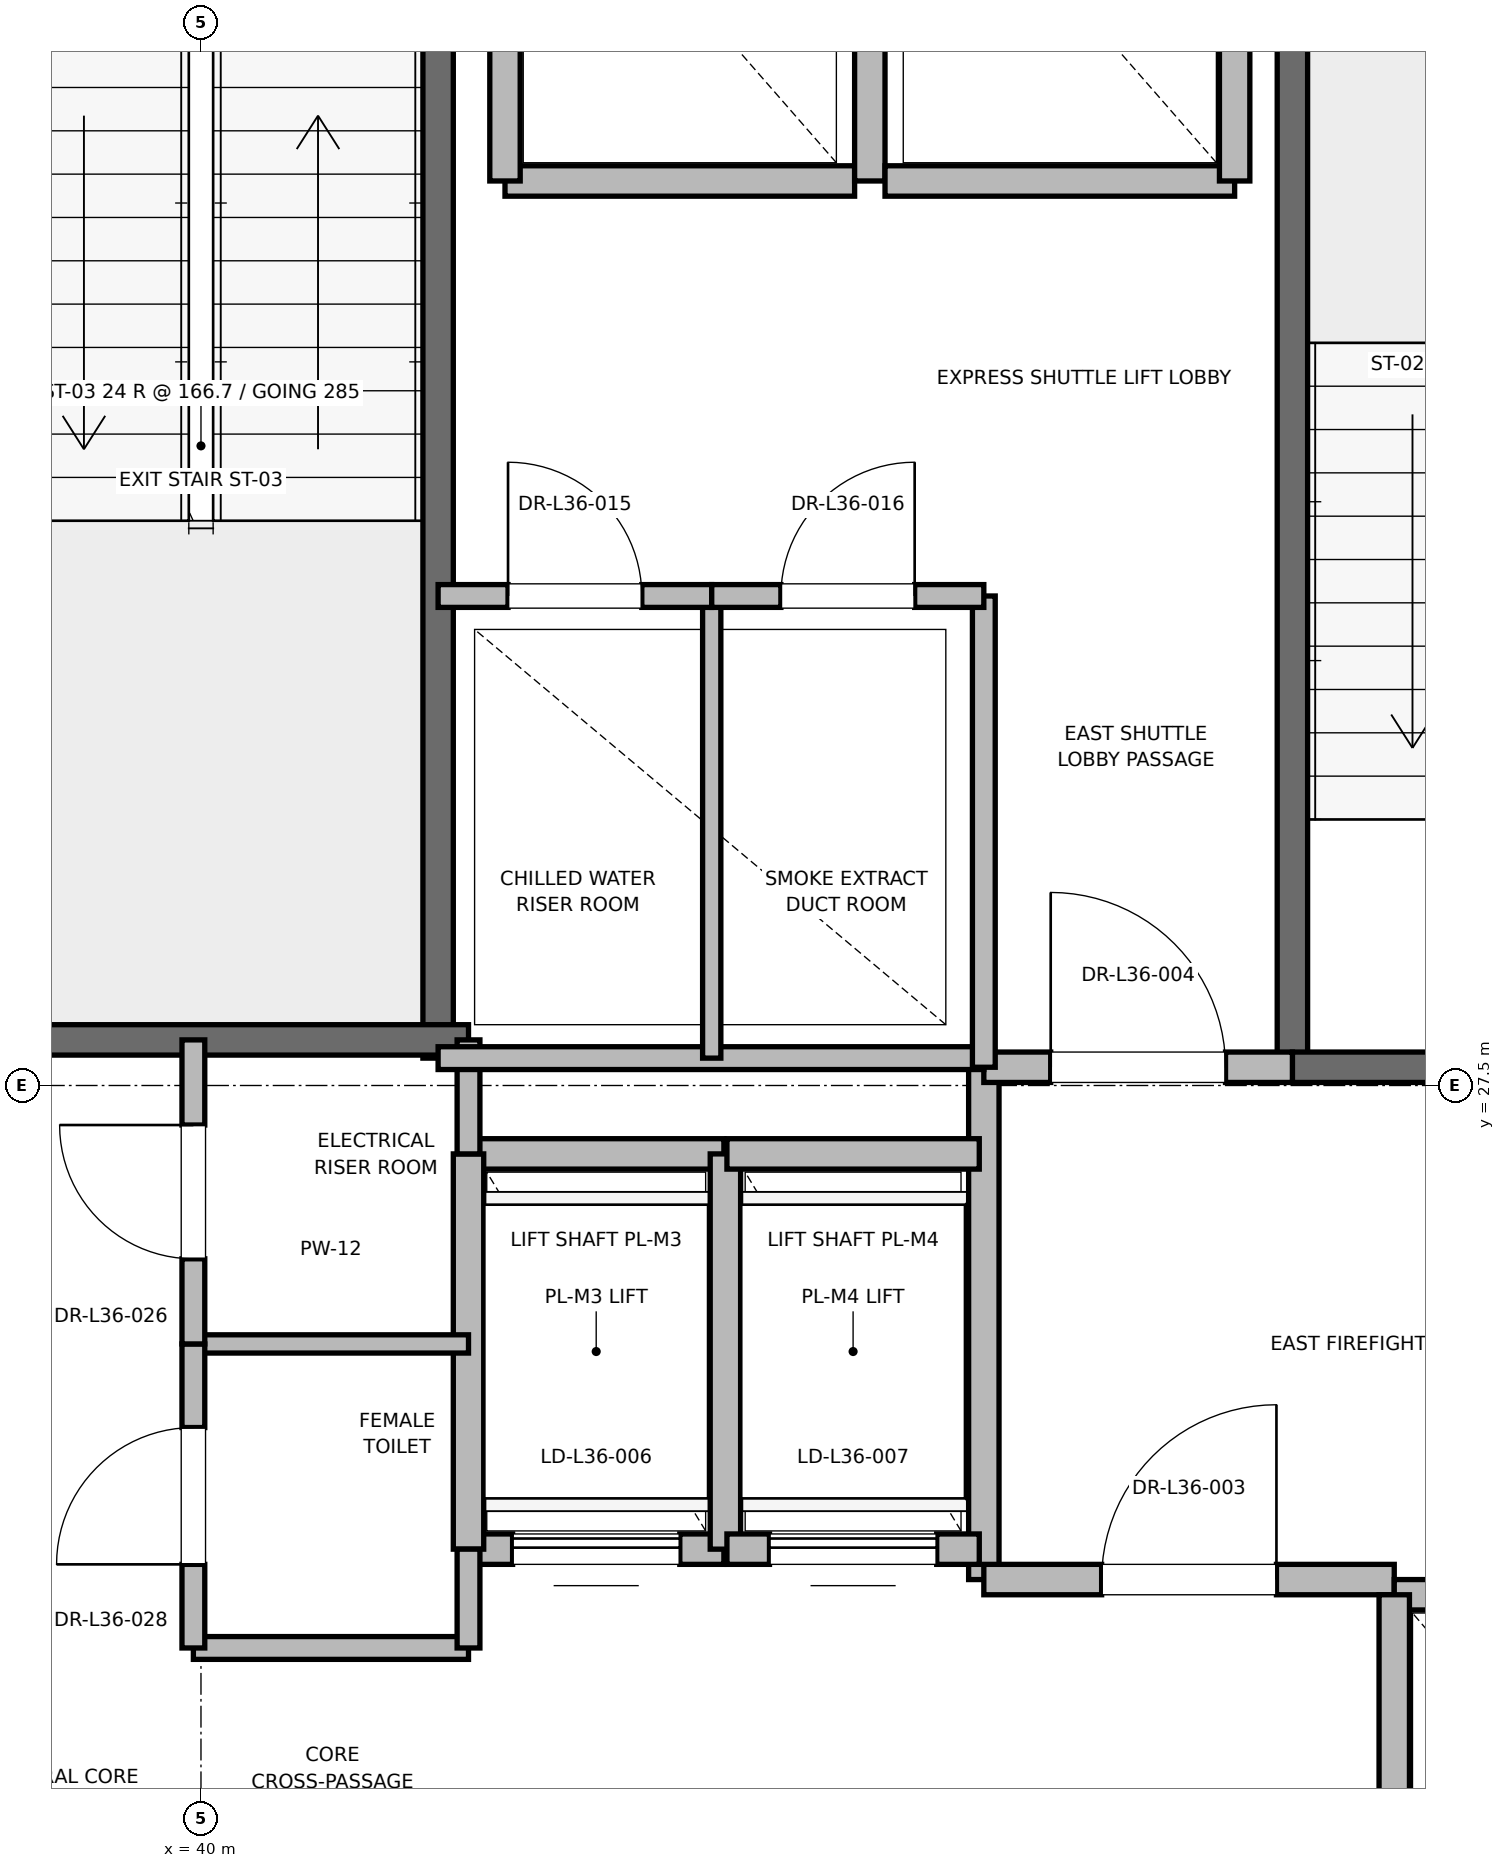
"""IFC4 building model, lengths in metres.
Left out: names, types, materials, properties, quantities, classifications, styles, units other than length and angle.
Written with IfcOpenShell. Run it as: python <this file> out.ifc"""

import sys

from ifc_helpers import new_model, si_unit, direction, frame, frame_2d, origin, place, context, subcontext, project, spatial, rectangle, extrude, element, fill, save


model = new_model("IFC4")
c1 = context("Model", 3, precision=1e-05, world=origin(), true_north=direction((0.0, 1.0)))
c2 = subcontext(c1, "Body", "Model", "MODEL_VIEW")
j1 = project(units=[si_unit("LENGTHUNIT", "METRE"), si_unit("PLANEANGLEUNIT", "RADIAN")], contexts=[c1])
p1 = place(None, origin())
s1 = spatial("IfcSite", under=j1, at=p1, CompositionType="ELEMENT")
p2 = place(p1, origin())
s2 = spatial("IfcBuilding", under=s1, at=p2, CompositionType="ELEMENT")
p3 = place(p2, frame((0.0, 0.0, 156.4)))
s3 = spatial("IfcBuildingStorey", under=s2, at=p3, CompositionType="ELEMENT", Elevation=156.4)
p4 = place(p3, frame((47.18, 27.62, 0.0), z_axis=(0.0, 0.0, 1.0), x_axis=(0.0, 1.0, 0.0)))
e1 = element("IfcWall", 1, at=p4, inside=s3, PredefinedType="SOLIDWALL", context=c2, shape_type="SweptSolid", body=[
    extrude(rectangle(XDim=8.18, YDim=0.2, at=frame_2d((4.09, 0.0))), origin(), (0.0, 0.0, 1.0), 3.775),
])
p5 = place(p3, frame((47.18, 27.62, 0.0), z_axis=(0.0, 0.0, 1.0), x_axis=(1.0, 0.0, 0.0)))
e2 = element("IfcWall", 2, at=p5, inside=s3, PredefinedType="SOLIDWALL", context=c2, shape_type="SweptSolid", body=[
    extrude(rectangle(XDim=3.12, YDim=0.2, at=frame_2d((1.56, 0.0))), origin(), (0.0, 0.0, 1.0), 3.775),
])
p6 = place(p5, frame((1.01, 0.0, 0.0)))
e3 = element("IfcOpeningElement", 3, at=p6, cuts=e2, PredefinedType="OPENING", context=c2, shape_type="SweptSolid", body=[
    extrude(rectangle(XDim=1.1, YDim=2.15, at=frame_2d((0.55, 1.075))), frame((0.0, 0.1, 0.0), z_axis=(0.0, -1.0, 0.0), x_axis=(1.0, 0.0, 0.0)), (0.0, 0.0, 1.0), 0.2),
])
p7 = place(p3, frame((41.56, 27.68, 0.0), z_axis=(0.0, 0.0, 1.0), x_axis=(0.0, 1.0, 0.0)))
e4 = element("IfcWall", 4, at=p7, inside=s3, PredefinedType="SOLIDWALL", context=c2, shape_type="SweptSolid", body=[
    extrude(rectangle(XDim=8.57, YDim=0.2, at=frame_2d((4.285, 0.0))), origin(), (0.0, 0.0, 1.0), 3.775),
])
p8 = place(p3, frame((38.44, 27.8, 0.0), z_axis=(0.0, 0.0, 1.0), x_axis=(1.0, 0.0, 0.0)))
e5 = element("IfcWall", 5, at=p8, inside=s3, PredefinedType="SOLIDWALL", context=c2, shape_type="SweptSolid", body=[
    extrude(rectangle(XDim=3.32, YDim=0.2, at=frame_2d((1.66, 0.0))), origin(), (0.0, 0.0, 1.0), 3.775),
])
p9 = place(p3, frame((45.15, 24.25, 0.0), z_axis=(0.0, 0.0, 1.0), x_axis=(0.0, 1.0, 0.0)))
e6 = element("IfcWall", 6, at=p9, inside=s3, PredefinedType="PARTITIONING", context=c2, shape_type="SweptSolid", body=[
    extrude(rectangle(XDim=3.37, YDim=0.2, at=frame_2d((1.685, 0.0))), origin(), (0.0, 0.0, 1.0), 3.775),
])
p10 = place(p3, frame((45.15, 24.25, 0.0), z_axis=(0.0, 0.0, 1.0), x_axis=(1.0, 0.0, 0.0)))
e7 = element("IfcWall", 7, at=p10, inside=s3, PredefinedType="PARTITIONING", context=c2, shape_type="SweptSolid", body=[
    extrude(rectangle(XDim=2.7, YDim=0.2, at=frame_2d((1.35, 0.0))), origin(), (0.0, 0.0, 1.0), 3.775),
])
p11 = place(p10, frame((0.775, 0.0, 0.0)))
e8 = element("IfcOpeningElement", 8, at=p11, cuts=e7, PredefinedType="OPENING", context=c2, shape_type="SweptSolid", body=[
    extrude(rectangle(XDim=1.15, YDim=2.2, at=frame_2d((0.575, 1.1))), frame((0.0, 0.1, 0.0), z_axis=(0.0, -1.0, 0.0), x_axis=(1.0, 0.0, 0.0)), (0.0, 0.0, 1.0), 0.2),
])
p12 = place(p3, frame((45.15, 27.62, 0.0), z_axis=(0.0, 0.0, 1.0), x_axis=(1.0, 0.0, 0.0)))
e9 = element("IfcWall", 9, at=p12, inside=s3, PredefinedType="PARTITIONING", context=c2, shape_type="SweptSolid", body=[
    extrude(rectangle(XDim=2.03, YDim=0.2, at=frame_2d((1.015, 0.0))), origin(), (0.0, 0.0, 1.0), 3.775),
])
p13 = place(p12, frame((0.44, 0.0, 0.0)))
e10 = element("IfcOpeningElement", 10, at=p13, cuts=e9, PredefinedType="OPENING", context=c2, shape_type="SweptSolid", body=[
    extrude(rectangle(XDim=1.15, YDim=2.2, at=frame_2d((0.575, 1.1))), frame((0.0, 0.1, 0.0), z_axis=(0.0, -1.0, 0.0), x_axis=(1.0, 0.0, 0.0)), (0.0, 0.0, 1.0), 0.2),
])
p14 = place(p3, frame((50.45, 24.15, 0.0), z_axis=(0.0, 0.0, 1.0), x_axis=(-1.0, 0.0, 0.0)))
e11 = element("IfcWall", 11, at=p14, inside=s3, PredefinedType="SOLIDWALL", context=c2, shape_type="SweptSolid", body=[
    extrude(rectangle(XDim=2.6, YDim=0.2, at=frame_2d((1.3, 0.0))), origin(), (0.0, 0.0, 1.0), 2.755),
])
p15 = place(p14, frame((0.75, 0.0, 0.0)))
e12 = element("IfcOpeningElement", 12, at=p15, cuts=e11, PredefinedType="OPENING", context=c2, shape_type="SweptSolid", body=[
    extrude(rectangle(XDim=1.1, YDim=2.2, at=frame_2d((0.55, 1.1))), frame((0.0, 0.1, 0.0), z_axis=(0.0, -1.0, 0.0), x_axis=(1.0, 0.0, 0.0)), (0.0, 0.0, 1.0), 0.2),
])
p16 = place(p3, frame((47.85, 24.15, 0.0), z_axis=(0.0, 0.0, 1.0), x_axis=(0.0, -1.0, 0.0)))
e13 = element("IfcWall", 13, at=p16, inside=s3, PredefinedType="SOLIDWALL", context=c2, shape_type="SweptSolid", body=[
    extrude(rectangle(XDim=3.0, YDim=0.2, at=frame_2d((1.5, 0.0))), origin(), (0.0, 0.0, 1.0), 3.775),
])
p17 = place(p3, frame((41.76, 24.45, 0.0), z_axis=(0.0, 0.0, 1.0), x_axis=(1.0, 0.0, 0.0)))
e14 = element("IfcWall", 14, at=p17, inside=s3, PredefinedType="SOLIDWALL", context=c2, shape_type="SweptSolid", body=[
    extrude(rectangle(XDim=1.68, YDim=0.2, at=frame_2d((0.84, 0.0))), origin(), (0.0, 0.0, 1.0), 3.775),
])
p18 = place(p17, frame((0.29, 0.0, 0.0)))
e15 = element("IfcOpeningElement", 15, at=p18, cuts=e14, PredefinedType="OPENING", context=c2, shape_type="SweptSolid", body=[
    extrude(rectangle(XDim=1.1, YDim=2.2, at=frame_2d((0.55, 1.1))), frame((0.0, 0.1, 0.0), z_axis=(0.0, -1.0, 0.0), x_axis=(1.0, 0.0, 0.0)), (0.0, 0.0, 1.0), 0.2),
])
p19 = place(p3, frame((43.44, 27.05, 0.0), z_axis=(0.0, 0.0, 1.0), x_axis=(-1.0, 0.0, 0.0)))
e16 = element("IfcWall", 16, at=p19, inside=s3, PredefinedType="SOLIDWALL", context=c2, shape_type="SweptSolid", body=[
    extrude(rectangle(XDim=1.68, YDim=0.2, at=frame_2d((0.84, 0.0))), origin(), (0.0, 0.0, 1.0), 3.775),
])
for number, where, z_axis, x_axis in (
    (17, (41.76, 27.05, 0.0), (0.0, 0.0, 1.0), (0.0, -1.0, 0.0)),
    (18, (43.45, 24.45, 0.0), (0.0, 0.0, 1.0), (0.0, 1.0, 0.0)),
):
    element("IfcWall", number, at=place(p3, frame(where, z_axis=z_axis, x_axis=x_axis)), inside=s3, PredefinedType="SOLIDWALL", context=c2, shape_type="SweptSolid", body=[
        extrude(rectangle(XDim=2.6, YDim=0.2, at=frame_2d((1.3, 0.0))), origin(), (0.0, 0.0, 1.0), 3.775),
    ])
p20 = place(p3, frame((43.46, 24.45, 0.0), z_axis=(0.0, 0.0, 1.0), x_axis=(1.0, 0.0, 0.0)))
e19 = element("IfcWall", 19, at=p20, inside=s3, PredefinedType="SOLIDWALL", context=c2, shape_type="SweptSolid", body=[
    extrude(rectangle(XDim=1.66, YDim=0.2, at=frame_2d((0.83, 0.0))), origin(), (0.0, 0.0, 1.0), 3.775),
])
p21 = place(p20, frame((0.28, 0.0, 0.0)))
e20 = element("IfcOpeningElement", 20, at=p21, cuts=e19, PredefinedType="OPENING", context=c2, shape_type="SweptSolid", body=[
    extrude(rectangle(XDim=1.1, YDim=2.2, at=frame_2d((0.55, 1.1))), frame((0.0, 0.1, 0.0), z_axis=(0.0, -1.0, 0.0), x_axis=(1.0, 0.0, 0.0)), (0.0, 0.0, 1.0), 0.2),
])
p22 = place(p3, frame((45.12, 27.05, 0.0), z_axis=(0.0, 0.0, 1.0), x_axis=(-1.0, 0.0, 0.0)))
e21 = element("IfcWall", 21, at=p22, inside=s3, PredefinedType="SOLIDWALL", context=c2, shape_type="SweptSolid", body=[
    extrude(rectangle(XDim=1.66, YDim=0.2, at=frame_2d((0.83, 0.0))), origin(), (0.0, 0.0, 1.0), 3.775),
])
p23 = place(p3, frame((42.0, 33.45, 0.0), z_axis=(0.0, 0.0, 1.0), x_axis=(1.0, 0.0, 0.0)))
e22 = element("IfcWall", 22, at=p23, inside=s3, PredefinedType="SOLIDWALL", context=c2, shape_type="SweptSolid", body=[
    extrude(rectangle(XDim=2.3, YDim=0.2, at=frame_2d((1.15, 0.0))), origin(), (0.0, 0.0, 1.0), 3.775),
])
for number, where, z_axis, x_axis in (
    (23, (42.0, 36.05, 0.0), (0.0, 0.0, 1.0), (0.0, -1.0, 0.0)),
    (24, (44.4, 33.45, 0.0), (0.0, 0.0, 1.0), (0.0, 1.0, 0.0)),
):
    element("IfcWall", number, at=place(p3, frame(where, z_axis=z_axis, x_axis=x_axis)), inside=s3, PredefinedType="SOLIDWALL", context=c2, shape_type="SweptSolid", body=[
        extrude(rectangle(XDim=2.6, YDim=0.2, at=frame_2d((1.3, 0.0))), origin(), (0.0, 0.0, 1.0), 2.755),
    ])
p24 = place(p3, frame((44.5, 33.45, 0.0), z_axis=(0.0, 0.0, 1.0), x_axis=(1.0, 0.0, 0.0)))
e25 = element("IfcWall", 25, at=p24, inside=s3, PredefinedType="SOLIDWALL", context=c2, shape_type="SweptSolid", body=[
    extrude(rectangle(XDim=2.3, YDim=0.2, at=frame_2d((1.15, 0.0))), origin(), (0.0, 0.0, 1.0), 3.775),
])
p25 = place(p3, frame((46.8, 33.45, 0.0), z_axis=(0.0, 0.0, 1.0), x_axis=(0.0, 1.0, 0.0)))
e26 = element("IfcWall", 26, at=p25, inside=s3, PredefinedType="SOLIDWALL", context=c2, shape_type="SweptSolid", body=[
    extrude(rectangle(XDim=2.6, YDim=0.2, at=frame_2d((1.3, 0.0))), origin(), (0.0, 0.0, 1.0), 3.775),
])
p26 = place(p3, frame((39.95, 23.8, 0.0), z_axis=(0.0, 0.0, 1.0), x_axis=(1.0, 0.0, 0.0)))
e27 = element("IfcWall", 27, at=p26, inside=s3, PredefinedType="PARTITIONING", context=c2, shape_type="SweptSolid", body=[
    extrude(rectangle(XDim=1.81, YDim=0.15, at=frame_2d((0.905, 0.0))), origin(), (0.0, 0.0, 1.0), 2.85),
])
p27 = place(p3, frame((39.95, 25.8, 0.0), z_axis=(0.0, 0.0, 1.0), x_axis=(1.0, 0.0, 0.0)))
e28 = element("IfcWall", 28, at=p27, inside=s3, PredefinedType="PARTITIONING", context=c2, shape_type="SweptSolid", body=[
    extrude(rectangle(XDim=1.81, YDim=0.12, at=frame_2d((0.905, 0.0))), origin(), (0.0, 0.0, 1.0), 2.85),
])
p28 = place(p3, frame((41.76, 23.8, 0.0), z_axis=(0.0, 0.0, 1.0), x_axis=(0.0, 1.0, 0.0)))
e29 = element("IfcWall", 29, at=p28, inside=s3, PredefinedType="PARTITIONING", context=c2, shape_type="SweptSolid", body=[
    extrude(rectangle(XDim=0.65, YDim=0.15, at=frame_2d((0.325, 0.0))), origin(), (0.0, 0.0, 1.0), 2.85),
])
p29 = place(p3, frame((41.76, 27.05, 0.0), z_axis=(0.0, 0.0, 1.0), x_axis=(0.0, 1.0, 0.0)))
e30 = element("IfcWall", 30, at=p29, inside=s3, PredefinedType="PARTITIONING", context=c2, shape_type="SweptSolid", body=[
    extrude(rectangle(XDim=0.75, YDim=0.15, at=frame_2d((0.375, 0.0))), origin(), (0.0, 0.0, 1.0), 2.85),
])
p30 = place(p3, frame((39.95, 23.8, 0.0), z_axis=(0.0, 0.0, 1.0), x_axis=(0.0, 1.0, 0.0)))
e31 = element("IfcWall", 31, at=p30, inside=s3, PredefinedType="PARTITIONING", context=c2, shape_type="SweptSolid", body=[
    extrude(rectangle(XDim=2.0, YDim=0.15, at=frame_2d((1.0, 0.0))), origin(), (0.0, 0.0, 1.0), 2.85),
])
p31 = place(p30, frame((0.55, 0.0, 0.0)))
e32 = element("IfcOpeningElement", 32, at=p31, cuts=e31, PredefinedType="OPENING", context=c2, shape_type="SweptSolid", body=[
    extrude(rectangle(XDim=0.9, YDim=2.1, at=frame_2d((0.45, 1.05))), frame((0.0, 0.075, 0.0), z_axis=(0.0, -1.0, 0.0), x_axis=(1.0, 0.0, 0.0)), (0.0, 0.0, 1.0), 0.15),
])
p32 = place(p3, frame((39.95, 25.8, 0.0), z_axis=(0.0, 0.0, 1.0), x_axis=(0.0, 1.0, 0.0)))
e33 = element("IfcWall", 33, at=p32, inside=s3, PredefinedType="PARTITIONING", context=c2, shape_type="SweptSolid", body=[
    extrude(rectangle(XDim=2.0, YDim=0.15, at=frame_2d((1.0, 0.0))), origin(), (0.0, 0.0, 1.0), 2.85),
])
p33 = place(p32, frame((0.56, 0.0, 0.0)))
e34 = element("IfcOpeningElement", 34, at=p33, cuts=e33, PredefinedType="OPENING", context=c2, shape_type="SweptSolid", body=[
    extrude(rectangle(XDim=0.88, YDim=2.1, at=frame_2d((0.44, 1.05))), frame((0.0, 0.075, 0.0), z_axis=(0.0, -1.0, 0.0), x_axis=(1.0, 0.0, 0.0)), (0.0, 0.0, 1.0), 0.15),
])
p34 = place(p3, frame((41.56, 27.68, 0.0), z_axis=(0.0, 0.0, 1.0), x_axis=(1.0, 0.0, 0.0)))
e35 = element("IfcWall", 35, at=p34, inside=s3, PredefinedType="PARTITIONING", context=c2, shape_type="SweptSolid", body=[
    extrude(rectangle(XDim=3.59, YDim=0.15, at=frame_2d((1.795, 0.0))), origin(), (0.0, 0.0, 1.0), 2.85),
])
p35 = place(p3, frame((45.15, 27.62, 0.0), z_axis=(0.0, 0.0, 1.0), x_axis=(0.0, 1.0, 0.0)))
e36 = element("IfcWall", 36, at=p35, inside=s3, PredefinedType="PARTITIONING", context=c2, shape_type="SweptSolid", body=[
    extrude(rectangle(XDim=3.1, YDim=0.15, at=frame_2d((1.55, 0.0))), origin(), (0.0, 0.0, 1.0), 2.85),
])
p36 = place(p3, frame((43.36, 27.68, 0.0), z_axis=(0.0, 0.0, 1.0), x_axis=(0.0, 1.0, 0.0)))
e37 = element("IfcWall", 37, at=p36, inside=s3, PredefinedType="PARTITIONING", context=c2, shape_type="SweptSolid", body=[
    extrude(rectangle(XDim=3.04, YDim=0.12, at=frame_2d((1.52, 0.0))), origin(), (0.0, 0.0, 1.0), 2.85),
])
p37 = place(p3, frame((41.56, 30.72, 0.0), z_axis=(0.0, 0.0, 1.0), x_axis=(1.0, 0.0, 0.0)))
e38 = element("IfcWall", 38, at=p37, inside=s3, PredefinedType="PARTITIONING", context=c2, shape_type="SweptSolid", body=[
    extrude(rectangle(XDim=1.8, YDim=0.15, at=frame_2d((0.9, 0.0))), origin(), (0.0, 0.0, 1.0), 2.85),
])
p38 = place(p37, frame((0.46, 0.0, 0.0)))
e39 = element("IfcOpeningElement", 39, at=p38, cuts=e38, PredefinedType="OPENING", context=c2, shape_type="SweptSolid", body=[
    extrude(rectangle(XDim=0.88, YDim=2.1, at=frame_2d((0.44, 1.05))), frame((0.0, 0.075, 0.0), z_axis=(0.0, -1.0, 0.0), x_axis=(1.0, 0.0, 0.0)), (0.0, 0.0, 1.0), 0.15),
])
p39 = place(p3, frame((43.36, 30.72, 0.0), z_axis=(0.0, 0.0, 1.0), x_axis=(1.0, 0.0, 0.0)))
e40 = element("IfcWall", 40, at=p39, inside=s3, PredefinedType="PARTITIONING", context=c2, shape_type="SweptSolid", body=[
    extrude(rectangle(XDim=1.79, YDim=0.15, at=frame_2d((0.895, 0.0))), origin(), (0.0, 0.0, 1.0), 2.85),
])
p40 = place(p39, frame((0.455, 0.0, 0.0)))
e41 = element("IfcOpeningElement", 41, at=p40, cuts=e40, PredefinedType="OPENING", context=c2, shape_type="SweptSolid", body=[
    extrude(rectangle(XDim=0.88, YDim=2.1, at=frame_2d((0.44, 1.05))), frame((0.0, 0.075, 0.0), z_axis=(0.0, -1.0, 0.0), x_axis=(1.0, 0.0, 0.0)), (0.0, 0.0, 1.0), 0.15),
])
p41 = place(p11, origin())
e42 = element("IfcDoor", 42, at=p41, inside=s3, OperationType="SINGLE_SWING_RIGHT", PredefinedType="DOOR", context=c2, shape_type="SweptSolid", body=[
    extrude(rectangle(XDim=1.15, YDim=2.2, at=frame_2d((0.575, 1.1))), frame((0.0, 0.025, 0.0), z_axis=(0.0, -1.0, 0.0), x_axis=(1.0, 0.0, 0.0)), (0.0, 0.0, 1.0), 0.05),
])
fill(e8, e42)
p42 = place(p13, origin())
e43 = element("IfcDoor", 43, at=p42, inside=s3, OperationType="SINGLE_SWING_LEFT", PredefinedType="DOOR", context=c2, shape_type="SweptSolid", body=[
    extrude(rectangle(XDim=1.15, YDim=2.2, at=frame_2d((0.575, 1.1))), frame((0.0, 0.025, 0.0), z_axis=(0.0, -1.0, 0.0), x_axis=(1.0, 0.0, 0.0)), (0.0, 0.0, 1.0), 0.05),
])
fill(e10, e43)
p43 = place(p18, origin())
e44 = element("IfcDoor", 44, at=p43, inside=s3, OperationType="SLIDING_TO_RIGHT", PredefinedType="DOOR", context=c2, shape_type="SweptSolid", body=[
    extrude(rectangle(XDim=1.1, YDim=2.2, at=frame_2d((0.55, 1.1))), frame((0.0, 0.025, 0.0), z_axis=(0.0, -1.0, 0.0), x_axis=(1.0, 0.0, 0.0)), (0.0, 0.0, 1.0), 0.05),
])
fill(e15, e44)
p44 = place(p21, origin())
e45 = element("IfcDoor", 45, at=p44, inside=s3, OperationType="SLIDING_TO_RIGHT", PredefinedType="DOOR", context=c2, shape_type="SweptSolid", body=[
    extrude(rectangle(XDim=1.1, YDim=2.2, at=frame_2d((0.55, 1.1))), frame((0.0, 0.025, 0.0), z_axis=(0.0, -1.0, 0.0), x_axis=(1.0, 0.0, 0.0)), (0.0, 0.0, 1.0), 0.05),
])
fill(e20, e45)
p45 = place(p31, origin())
e46 = element("IfcDoor", 46, at=p45, inside=s3, OperationType="SINGLE_SWING_LEFT", PredefinedType="DOOR", context=c2, shape_type="SweptSolid", body=[
    extrude(rectangle(XDim=0.9, YDim=2.1, at=frame_2d((0.45, 1.05))), frame((0.0, 0.025, 0.0), z_axis=(0.0, -1.0, 0.0), x_axis=(1.0, 0.0, 0.0)), (0.0, 0.0, 1.0), 0.05),
])
fill(e32, e46)
p46 = place(p33, origin())
e47 = element("IfcDoor", 47, at=p46, inside=s3, OperationType="SINGLE_SWING_RIGHT", PredefinedType="DOOR", context=c2, shape_type="SweptSolid", body=[
    extrude(rectangle(XDim=0.88, YDim=2.1, at=frame_2d((0.44, 1.05))), frame((0.0, 0.025, 0.0), z_axis=(0.0, -1.0, 0.0), x_axis=(1.0, 0.0, 0.0)), (0.0, 0.0, 1.0), 0.05),
])
fill(e34, e47)
p47 = place(p38, origin())
e48 = element("IfcDoor", 48, at=p47, inside=s3, OperationType="SINGLE_SWING_LEFT", PredefinedType="DOOR", context=c2, shape_type="SweptSolid", body=[
    extrude(rectangle(XDim=0.88, YDim=2.1, at=frame_2d((0.44, 1.05))), frame((0.0, 0.025, 0.0), z_axis=(0.0, -1.0, 0.0), x_axis=(1.0, 0.0, 0.0)), (0.0, 0.0, 1.0), 0.05),
])
fill(e39, e48)
p48 = place(p40, origin())
e49 = element("IfcDoor", 49, at=p48, inside=s3, OperationType="SINGLE_SWING_RIGHT", PredefinedType="DOOR", context=c2, shape_type="SweptSolid", body=[
    extrude(rectangle(XDim=0.88, YDim=2.1, at=frame_2d((0.44, 1.05))), frame((0.0, 0.025, 0.0), z_axis=(0.0, -1.0, 0.0), x_axis=(1.0, 0.0, 0.0)), (0.0, 0.0, 1.0), 0.05),
])
fill(e41, e49)
save(model, sys.argv[1])
